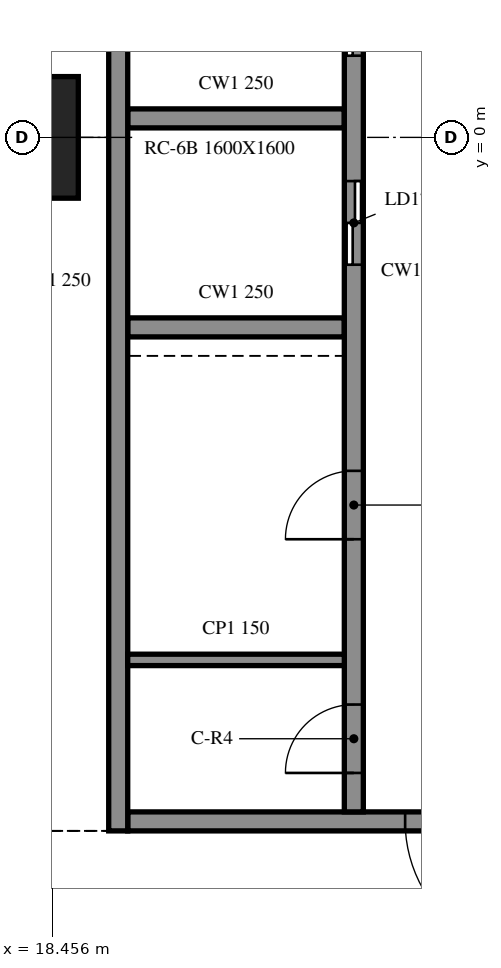
"""IFC4 building model, lengths in metres.
Left out: names, types, materials, properties, quantities, classifications, styles, units other than length and angle.
Written with IfcOpenShell. Run it as: python <this file> out.ifc"""

import sys

from ifc_helpers import new_model, si_unit, direction, frame, frame_2d, origin, origin_2d, place, context, subcontext, project, spatial, rectangle, extrude, element, fill, save


model = new_model("IFC4")
c1 = context("Model", 3, precision=1e-05, world=origin(), true_north=direction((0.0, 1.0)))
c2 = subcontext(c1, "Body", "Model", "MODEL_VIEW")
j1 = project(units=[si_unit("LENGTHUNIT", "METRE"), si_unit("PLANEANGLEUNIT", "RADIAN")], contexts=[c1])
p1 = place(None, origin())
s1 = spatial("IfcSite", under=j1, at=p1, CompositionType="ELEMENT")
p2 = place(p1, origin())
s2 = spatial("IfcBuilding", under=s1, at=p2, CompositionType="ELEMENT")
p3 = place(p2, frame((0.0, 0.0, 41.6)))
s3 = spatial("IfcBuildingStorey", under=s2, at=p3, CompositionType="ELEMENT", Elevation=41.6)
p4 = place(p3, frame((18.0, 0.0, -0.55), z_axis=(0.0, 0.0, 1.0), x_axis=(1.0, 0.0, 0.0)))
e1 = element("IfcColumn", 1, at=p4, inside=s3, PredefinedType="COLUMN", context=c2, shape_type="SweptSolid", body=[
    extrude(rectangle(XDim=1.6, YDim=1.6, at=origin_2d()), origin(), (0.0, 0.0, 1.0), 4.61),
])
p5 = place(p3, frame((19.325, 15.125, 0.0), z_axis=(0.0, 0.0, 1.0), x_axis=(0.0, -1.0, 0.0)))
e2 = element("IfcWall", 2, at=p5, inside=s3, PredefinedType="SOLIDWALL", context=c2, shape_type="SweptSolid", body=[
    extrude(rectangle(XDim=24.25, YDim=0.25, at=frame_2d((12.125, 0.0))), origin(), (0.0, 0.0, 1.0), 4.06),
])
p6 = place(p3, frame((28.55, -9.0, 0.0), z_axis=(0.0, 0.0, 1.0), x_axis=(-1.0, 0.0, 0.0)))
e3 = element("IfcWall", 3, at=p6, inside=s3, PredefinedType="SOLIDWALL", context=c2, shape_type="SweptSolid", body=[
    extrude(rectangle(XDim=9.1, YDim=0.25, at=frame_2d((4.55, 0.0))), origin(), (0.0, 0.0, 1.0), 4.06),
])
p7 = place(p6, frame((3.65, 0.0, 0.0)))
e4 = element("IfcOpeningElement", 4, at=p7, cuts=e3, PredefinedType="OPENING", context=c2, shape_type="SweptSolid", body=[
    extrude(rectangle(XDim=1.8, YDim=2.1, at=frame_2d((0.9, 1.05))), frame((0.0, 0.135, 0.0), z_axis=(0.0, -1.0, 0.0), x_axis=(1.0, 0.0, 0.0)), (0.0, 0.0, 1.0), 0.27),
])
p8 = place(p3, frame((22.425, -8.875, 0.0), z_axis=(0.0, 0.0, 1.0), x_axis=(0.0, 1.0, 0.0)))
e5 = element("IfcWall", 5, at=p8, inside=s3, PredefinedType="SOLIDWALL", context=c2, shape_type="SweptSolid", body=[
    extrude(rectangle(XDim=17.5, YDim=0.25, at=frame_2d((8.75, 0.0))), origin(), (0.0, 0.0, 1.0), 4.06),
])
p9 = place(p8, frame((7.2, 0.0, 0.0)))
e6 = element("IfcOpeningElement", 6, at=p9, cuts=e5, PredefinedType="OPENING", context=c2, shape_type="SweptSolid", body=[
    extrude(rectangle(XDim=1.1, YDim=2.1, at=frame_2d((0.55, 1.05))), frame((0.0, 0.135, 0.0), z_axis=(0.0, -1.0, 0.0), x_axis=(1.0, 0.0, 0.0)), (0.0, 0.0, 1.0), 0.27),
])
p10 = place(p8, frame((9.95, 0.0, 0.0)))
e7 = element("IfcOpeningElement", 7, at=p10, cuts=e5, PredefinedType="OPENING", context=c2, shape_type="SweptSolid", body=[
    extrude(rectangle(XDim=1.1, YDim=2.1, at=frame_2d((0.55, 1.05))), frame((0.0, 0.135, 0.0), z_axis=(0.0, -1.0, 0.0), x_axis=(1.0, 0.0, 0.0)), (0.0, 0.0, 1.0), 0.27),
])
p11 = place(p8, frame((12.7, 0.0, 0.0)))
e8 = element("IfcOpeningElement", 8, at=p11, cuts=e5, PredefinedType="OPENING", context=c2, shape_type="SweptSolid", body=[
    extrude(rectangle(XDim=1.1, YDim=2.1, at=frame_2d((0.55, 1.05))), frame((0.0, 0.135, 0.0), z_axis=(0.0, -1.0, 0.0), x_axis=(1.0, 0.0, 0.0)), (0.0, 0.0, 1.0), 0.27),
])
p12 = place(p8, frame((15.45, 0.0, 0.0)))
e9 = element("IfcOpeningElement", 9, at=p12, cuts=e5, PredefinedType="OPENING", context=c2, shape_type="SweptSolid", body=[
    extrude(rectangle(XDim=1.1, YDim=2.1, at=frame_2d((0.55, 1.05))), frame((0.0, 0.135, 0.0), z_axis=(0.0, -1.0, 0.0), x_axis=(1.0, 0.0, 0.0)), (0.0, 0.0, 1.0), 0.27),
])
p13 = place(p8, frame((0.512, 0.0, 0.0)))
e10 = element("IfcOpeningElement", 10, at=p13, cuts=e5, PredefinedType="OPENING", context=c2, shape_type="SweptSolid", body=[
    extrude(rectangle(XDim=0.9, YDim=2.1, at=frame_2d((0.45, 1.05))), frame((0.0, 0.135, 0.0), z_axis=(0.0, -1.0, 0.0), x_axis=(1.0, 0.0, 0.0)), (0.0, 0.0, 1.0), 0.27),
])
p14 = place(p8, frame((3.587, 0.0, 0.0)))
e11 = element("IfcOpeningElement", 11, at=p14, cuts=e5, PredefinedType="OPENING", context=c2, shape_type="SweptSolid", body=[
    extrude(rectangle(XDim=0.9, YDim=2.1, at=frame_2d((0.45, 1.05))), frame((0.0, 0.135, 0.0), z_axis=(0.0, -1.0, 0.0), x_axis=(1.0, 0.0, 0.0)), (0.0, 0.0, 1.0), 0.27),
])
for number, where, z_axis, x_axis in (
    (12, (19.45, -2.5, 0.0), (0.0, 0.0, 1.0), (1.0, 0.0, 0.0)),
    (13, (19.45, 0.25, 0.0), (0.0, 0.0, 1.0), (1.0, 0.0, 0.0)),
):
    element("IfcWall", number, at=place(p3, frame(where, z_axis=z_axis, x_axis=x_axis)), inside=s3, PredefinedType="SOLIDWALL", context=c2, shape_type="SweptSolid", body=[
        extrude(rectangle(XDim=2.85, YDim=0.25, at=frame_2d((1.425, 0.0))), origin(), (0.0, 0.0, 1.0), 4.06),
    ])
p15 = place(p3, frame((19.45, -6.875, 0.0), z_axis=(0.0, 0.0, 1.0), x_axis=(1.0, 0.0, 0.0)))
e14 = element("IfcWall", 14, at=p15, inside=s3, PredefinedType="PARTITIONING", context=c2, shape_type="SweptSolid", body=[
    extrude(rectangle(XDim=2.85, YDim=0.15, at=frame_2d((1.425, 0.0))), origin(), (0.0, 0.0, 1.0), 4.06),
])
p16 = place(p7, origin())
e15 = element("IfcDoor", 15, at=p16, inside=s3, OperationType="DOUBLE_DOOR_SINGLE_SWING", PredefinedType="DOOR", context=c2, shape_type="SweptSolid", body=[
    extrude(rectangle(XDim=1.8, YDim=2.1, at=frame_2d((0.9, 1.05))), frame((0.0, 0.025, 0.0), z_axis=(0.0, -1.0, 0.0), x_axis=(1.0, 0.0, 0.0)), (0.0, 0.0, 1.0), 0.05),
])
fill(e4, e15)
p17 = place(p9, origin())
e16 = element("IfcDoor", 16, at=p17, inside=s3, OperationType="DOUBLE_DOOR_SLIDING", PredefinedType="DOOR", context=c2, shape_type="SweptSolid", body=[
    extrude(rectangle(XDim=1.1, YDim=2.1, at=frame_2d((0.55, 1.05))), frame((0.0, 0.025, 0.0), z_axis=(0.0, -1.0, 0.0), x_axis=(1.0, 0.0, 0.0)), (0.0, 0.0, 1.0), 0.05),
])
fill(e6, e16)
p18 = place(p10, origin())
e17 = element("IfcDoor", 17, at=p18, inside=s3, OperationType="DOUBLE_DOOR_SLIDING", PredefinedType="DOOR", context=c2, shape_type="SweptSolid", body=[
    extrude(rectangle(XDim=1.1, YDim=2.1, at=frame_2d((0.55, 1.05))), frame((0.0, 0.025, 0.0), z_axis=(0.0, -1.0, 0.0), x_axis=(1.0, 0.0, 0.0)), (0.0, 0.0, 1.0), 0.05),
])
fill(e7, e17)
p19 = place(p13, origin())
e18 = element("IfcDoor", 18, at=p19, inside=s3, OperationType="SINGLE_SWING_RIGHT", PredefinedType="DOOR", context=c2, shape_type="SweptSolid", body=[
    extrude(rectangle(XDim=0.9, YDim=2.1, at=frame_2d((0.45, 1.05))), frame((0.0, 0.025, 0.0), z_axis=(0.0, -1.0, 0.0), x_axis=(1.0, 0.0, 0.0)), (0.0, 0.0, 1.0), 0.05),
])
fill(e10, e18)
p20 = place(p14, origin())
e19 = element("IfcDoor", 19, at=p20, inside=s3, OperationType="SINGLE_SWING_LEFT", PredefinedType="DOOR", context=c2, shape_type="SweptSolid", body=[
    extrude(rectangle(XDim=0.9, YDim=2.1, at=frame_2d((0.45, 1.05))), frame((0.0, 0.025, 0.0), z_axis=(0.0, -1.0, 0.0), x_axis=(1.0, 0.0, 0.0)), (0.0, 0.0, 1.0), 0.05),
])
fill(e11, e19)
save(model, sys.argv[1])
